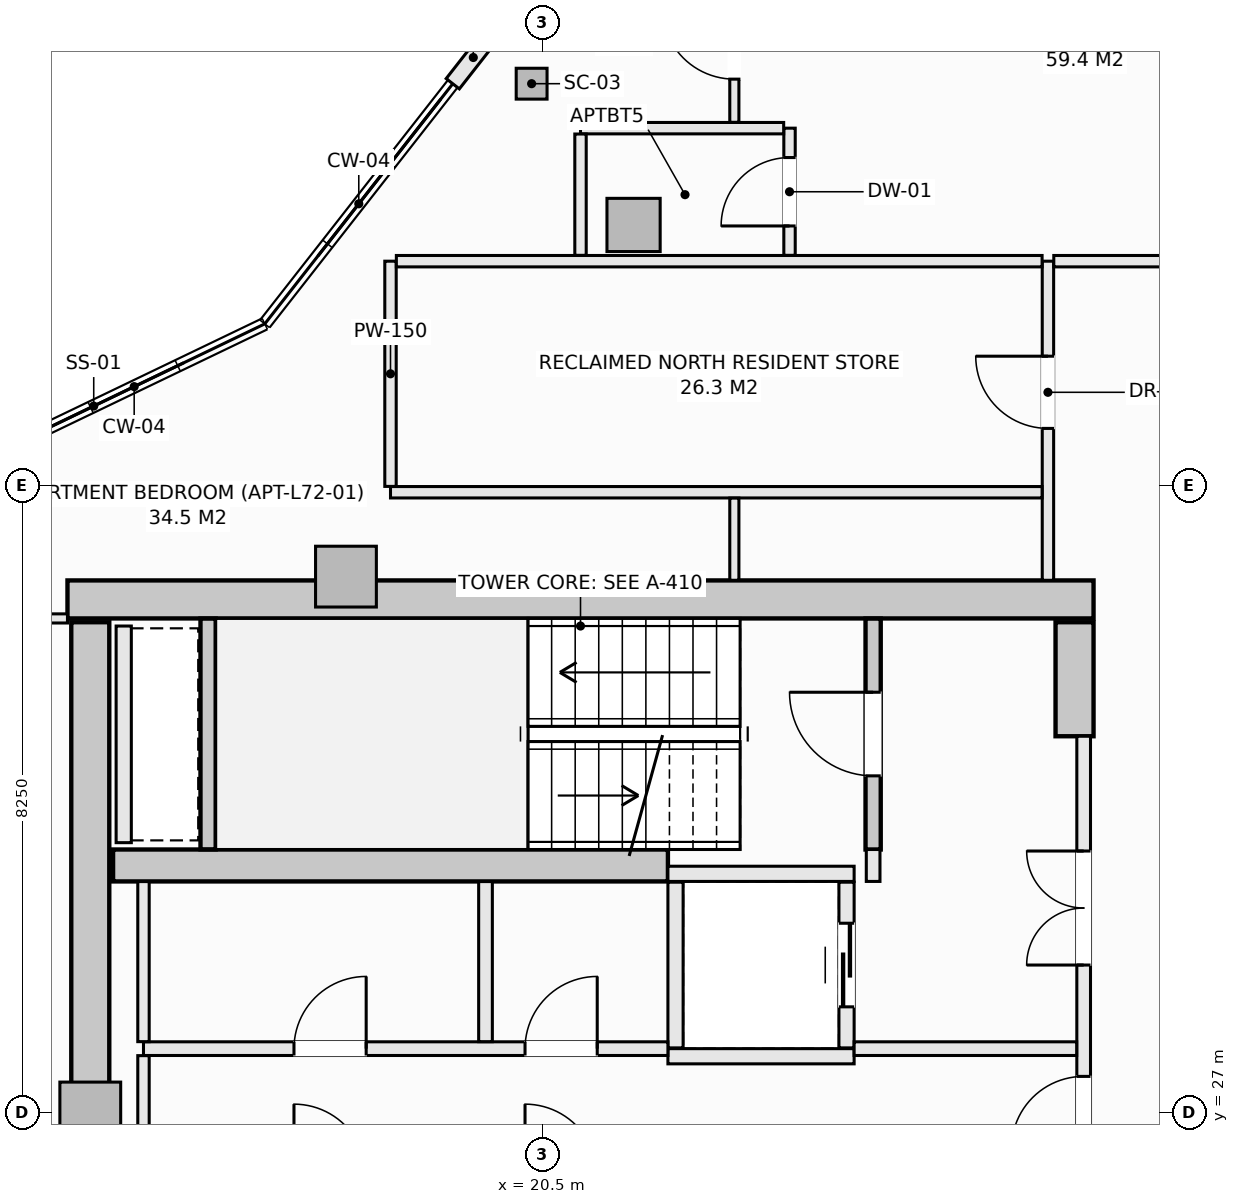
"""IFC4 building model, lengths in metres.
Left out: names, types, materials, properties, quantities, classifications, styles, units other than length and angle.
Written with IfcOpenShell. Run it as: python <this file> out.ifc"""

import sys

from ifc_helpers import new_model, si_unit, direction, frame, frame_2d, origin, origin_2d, place, context, subcontext, project, spatial, rectangle, hollow_rectangle, extrude, element, fill, save


model = new_model("IFC4")
c1 = context("Model", 3, precision=1e-05, world=origin(), true_north=direction((0.0, 1.0)))
c2 = subcontext(c1, "Body", "Model", "MODEL_VIEW")
j1 = project(units=[si_unit("LENGTHUNIT", "METRE"), si_unit("PLANEANGLEUNIT", "RADIAN")], contexts=[c1])
p1 = place(None, origin())
s1 = spatial("IfcSite", under=j1, at=p1, CompositionType="ELEMENT")
p2 = place(p1, origin())
s2 = spatial("IfcBuilding", under=s1, at=p2, CompositionType="ELEMENT")
p3 = place(p2, frame((0.0, 0.0, 265.7)))
s3 = spatial("IfcBuildingStorey", under=s2, at=p3, CompositionType="ELEMENT", Elevation=265.7)
p4 = place(p3, frame((14.25, 33.75, -0.27), z_axis=(0.0, 0.0, 1.0), x_axis=(1.0, 0.0, 0.0)))
e1 = element("IfcWall", 1, at=p4, inside=s3, PredefinedType="SHEAR", context=c2, shape_type="SweptSolid", body=[
    extrude(rectangle(XDim=13.5, YDim=0.5, at=frame_2d((6.75, 0.0))), origin(), (0.0, 0.0, 1.0), 3.3),
])
p5 = place(p3, frame((14.55, 20.55, -0.27), z_axis=(0.0, 0.0, 1.0), x_axis=(0.0, 1.0, 0.0)))
e2 = element("IfcWall", 2, at=p5, inside=s3, PredefinedType="SHEAR", context=c2, shape_type="SweptSolid", body=[
    extrude(rectangle(XDim=12.9, YDim=0.5, at=frame_2d((6.45, 0.0))), origin(), (0.0, 0.0, 1.0), 3.3),
])
p6 = place(p3, frame((27.5, 31.95, -0.27), z_axis=(0.0, 0.0, 1.0), x_axis=(0.0, 1.0, 0.0)))
e3 = element("IfcWall", 3, at=p6, inside=s3, PredefinedType="SHEAR", context=c2, shape_type="SweptSolid", body=[
    extrude(rectangle(XDim=1.5, YDim=0.5, at=frame_2d((0.75, 0.0))), origin(), (0.0, 0.0, 1.0), 3.3),
])
p7 = place(p3, frame((14.85, 30.25, -0.27), z_axis=(0.0, 0.0, 1.0), x_axis=(1.0, 0.0, 0.0)))
e4 = element("IfcWall", 4, at=p7, inside=s3, PredefinedType="SHEAR", context=c2, shape_type="SweptSolid", body=[
    extrude(rectangle(XDim=7.3, YDim=0.42, at=frame_2d((3.65, 0.0))), origin(), (0.0, 0.0, 1.0), 3.3),
])
p8 = place(p3, frame((20.357, 40.535, -0.27), z_axis=(0.0, 0.0, 1.0), x_axis=(1.0, 0.0, 0.0)))
e5 = element("IfcColumn", 5, at=p8, inside=s3, PredefinedType="COLUMN", context=c2, shape_type="SweptSolid", body=[
    extrude(hollow_rectangle(XDim=0.406, YDim=0.406, WallThickness=0.016, at=origin_2d()), origin(), (0.0, 0.0, 1.0), 3.3),
])
p9 = place(p3, frame((21.698, 38.677, -0.27), z_axis=(0.0, 0.0, 1.0), x_axis=(1.0, 0.0, 0.0)))
e6 = element("IfcColumn", 6, at=p9, inside=s3, PredefinedType="COLUMN", context=c2, shape_type="SweptSolid", body=[
    extrude(rectangle(XDim=0.7, YDim=0.7, at=origin_2d()), origin(), (0.0, 0.0, 1.0), 3.3),
])
for number, where, z_axis, x_axis in (
    (7, (17.914, 34.05, -0.27), (0.0, 0.0, 1.0), (1.0, 0.0, 0.0)),
    (8, (14.55, 27.0, -0.27), (0.0, 0.0, 1.0), (1.0, 0.0, 0.0)),
):
    element("IfcColumn", number, at=place(p3, frame(where, z_axis=z_axis, x_axis=x_axis)), inside=s3, PredefinedType="PILASTER", context=c2, shape_type="SweptSolid", body=[
        extrude(rectangle(XDim=0.8, YDim=0.8, at=origin_2d()), origin(), (0.0, 0.0, 1.0), 3.3),
    ])
p10 = place(p3, frame((19.319, 40.534, 0.0), z_axis=(0.0, 0.0, 1.0), x_axis=(0.61640589237, 0.787428584604, 0.0)))
e9 = element("IfcWall", 9, at=p10, inside=s3, PredefinedType="SOLIDWALL", context=c2, shape_type="SweptSolid", body=[
    extrude(rectangle(XDim=0.876, YDim=0.22, at=frame_2d((0.438, 0.0))), origin(), (0.0, 0.0, 1.0), 2.605),
])
p11 = place(p3, frame((24.85, 30.46, -0.27), z_axis=(0.0, 0.0, 1.0), x_axis=(0.0, 1.0, 0.0)))
e10 = element("IfcWall", 10, at=p11, inside=s3, PredefinedType="SHEAR", context=c2, shape_type="SweptSolid", body=[
    extrude(rectangle(XDim=3.038, YDim=0.2, at=frame_2d((1.519, 0.0))), origin(), (0.0, 0.0, 1.0), 3.3),
])
p12 = place(p11, frame((0.969, 0.0, 0.27)))
e11 = element("IfcOpeningElement", 11, at=p12, cuts=e10, PredefinedType="OPENING", context=c2, shape_type="SweptSolid", body=[
    extrude(rectangle(XDim=1.1, YDim=2.15, at=frame_2d((0.55, 1.075))), frame((0.0, 0.11, 0.0), z_axis=(0.0, -1.0, 0.0), x_axis=(1.0, 0.0, 0.0)), (0.0, 0.0, 1.0), 0.22),
])
p13 = place(p3, frame((16.1, 30.462, -0.27), z_axis=(0.0, 0.0, 1.0), x_axis=(0.0, 1.0, 0.0)))
e12 = element("IfcWall", 12, at=p13, inside=s3, PredefinedType="SHEAR", context=c2, shape_type="SweptSolid", body=[
    extrude(rectangle(XDim=3.036, YDim=0.2, at=frame_2d((1.518, 0.0))), origin(), (0.0, 0.0, 1.0), 3.3),
])
for number, where, z_axis, x_axis in (
    (13, (22.15, 30.14, 0.0), (0.0, 0.0, 1.0), (1.0, 0.0, 0.0)),
    (14, (22.15, 27.74, 0.0), (0.0, 0.0, 1.0), (1.0, 0.0, 0.0)),
):
    element("IfcWall", number, at=place(p3, frame(where, z_axis=z_axis, x_axis=x_axis)), inside=s3, PredefinedType="SOLIDWALL", context=c2, shape_type="SweptSolid", body=[
        extrude(rectangle(XDim=2.45, YDim=0.2, at=frame_2d((1.225, 0.0))), origin(), (0.0, 0.0, 1.0), 3.03),
    ])
p14 = place(p3, frame((22.25, 27.85, 0.0), z_axis=(0.0, 0.0, 1.0), x_axis=(0.0, 1.0, 0.0)))
e15 = element("IfcWall", 15, at=p14, inside=s3, PredefinedType="SOLIDWALL", context=c2, shape_type="SweptSolid", body=[
    extrude(rectangle(XDim=2.18, YDim=0.2, at=frame_2d((1.09, 0.0))), origin(), (0.0, 0.0, 1.0), 3.03),
])
p15 = place(p3, frame((24.5, 27.85, 0.0), z_axis=(0.0, 0.0, 1.0), x_axis=(0.0, 1.0, 0.0)))
e16 = element("IfcWall", 16, at=p15, inside=s3, PredefinedType="SOLIDWALL", context=c2, shape_type="SweptSolid", body=[
    extrude(rectangle(XDim=2.18, YDim=0.2, at=frame_2d((1.09, 0.0))), origin(), (0.0, 0.0, 1.0), 3.03),
])
p16 = place(p15, frame((0.54, 0.0, 0.0)))
e17 = element("IfcOpeningElement", 17, at=p16, cuts=e16, PredefinedType="OPENING", context=c2, shape_type="SweptSolid", body=[
    extrude(rectangle(XDim=1.1, YDim=2.2, at=frame_2d((0.55, 1.1))), frame((0.0, 0.11, 0.0), z_axis=(0.0, -1.0, 0.0), x_axis=(1.0, 0.0, 0.0)), (0.0, 0.0, 1.0), 0.22),
])
p17 = place(p3, frame((14.99, 30.55, 0.0), z_axis=(0.0, 0.0, 1.0), x_axis=(0.0, 1.0, 0.0)))
e18 = element("IfcWall", 18, at=p17, inside=s3, PredefinedType="SOLIDWALL", context=c2, shape_type="SweptSolid", body=[
    extrude(rectangle(XDim=2.85, YDim=0.2, at=frame_2d((1.425, 0.0))), origin(), (0.0, 0.0, 1.0), 3.03),
])
p18 = place(p3, frame((24.85, 30.04, 0.0), z_axis=(0.0, 0.0, 1.0), x_axis=(0.0, 1.0, 0.0)))
e19 = element("IfcWall", 19, at=p18, inside=s3, PredefinedType="SOLIDWALL", context=c2, shape_type="SweptSolid", body=[
    extrude(rectangle(XDim=0.42, YDim=0.18, at=frame_2d((0.21, 0.0))), origin(), (0.0, 0.0, 1.0), 3.03),
])
p19 = place(p3, frame((27.62, 22.05, 0.0), z_axis=(0.0, 0.0, 1.0), x_axis=(0.0, 1.0, 0.0)))
e20 = element("IfcWall", 20, at=p19, inside=s3, PredefinedType="SOLIDWALL", context=c2, shape_type="SweptSolid", body=[
    extrude(rectangle(XDim=9.9, YDim=0.18, at=frame_2d((4.95, 0.0))), origin(), (0.0, 0.0, 1.0), 3.03),
])
p20 = place(p19, frame((4.475, 0.0, 0.0)))
e21 = element("IfcOpeningElement", 21, at=p20, cuts=e20, PredefinedType="OPENING", context=c2, shape_type="SweptSolid", body=[
    extrude(rectangle(XDim=0.95, YDim=2.1, at=frame_2d((0.475, 1.05))), frame((0.0, 0.1, 0.0), z_axis=(0.0, -1.0, 0.0), x_axis=(1.0, 0.0, 0.0)), (0.0, 0.0, 1.0), 0.2),
])
p21 = place(p19, frame((6.89, 0.0, 0.0)))
e22 = element("IfcOpeningElement", 22, at=p21, cuts=e20, PredefinedType="OPENING", context=c2, shape_type="SweptSolid", body=[
    extrude(rectangle(XDim=1.5, YDim=2.2, at=frame_2d((0.75, 1.1))), frame((0.0, 0.1, 0.0), z_axis=(0.0, -1.0, 0.0), x_axis=(1.0, 0.0, 0.0)), (0.0, 0.0, 1.0), 0.2),
])
p22 = place(p19, frame((1.51, 0.0, 0.0)))
e23 = element("IfcOpeningElement", 23, at=p22, cuts=e20, PredefinedType="OPENING", context=c2, shape_type="SweptSolid", body=[
    extrude(rectangle(XDim=1.5, YDim=2.2, at=frame_2d((0.75, 1.1))), frame((0.0, 0.1, 0.0), z_axis=(0.0, -1.0, 0.0), x_axis=(1.0, 0.0, 0.0)), (0.0, 0.0, 1.0), 0.2),
])
p23 = place(p3, frame((15.25, 27.84, 0.0), z_axis=(0.0, 0.0, 1.0), x_axis=(1.0, 0.0, 0.0)))
e24 = element("IfcWall", 24, at=p23, inside=s3, PredefinedType="SOLIDWALL", context=c2, shape_type="SweptSolid", body=[
    extrude(rectangle(XDim=6.9, YDim=0.18, at=frame_2d((3.45, 0.0))), origin(), (0.0, 0.0, 1.0), 3.03),
])
p24 = place(p23, frame((5.02, 0.0, 0.0)))
e25 = element("IfcOpeningElement", 25, at=p24, cuts=e24, PredefinedType="OPENING", context=c2, shape_type="SweptSolid", body=[
    extrude(rectangle(XDim=0.95, YDim=2.1, at=frame_2d((0.475, 1.05))), frame((0.0, 0.1, 0.0), z_axis=(0.0, -1.0, 0.0), x_axis=(1.0, 0.0, 0.0)), (0.0, 0.0, 1.0), 0.2),
])
p25 = place(p23, frame((1.98, 0.0, 0.0)))
e26 = element("IfcOpeningElement", 26, at=p25, cuts=e24, PredefinedType="OPENING", context=c2, shape_type="SweptSolid", body=[
    extrude(rectangle(XDim=0.95, YDim=2.1, at=frame_2d((0.475, 1.05))), frame((0.0, 0.1, 0.0), z_axis=(0.0, -1.0, 0.0), x_axis=(1.0, 0.0, 0.0)), (0.0, 0.0, 1.0), 0.2),
])
p26 = place(p3, frame((24.6, 27.84, 0.0), z_axis=(0.0, 0.0, 1.0), x_axis=(1.0, 0.0, 0.0)))
e27 = element("IfcWall", 27, at=p26, inside=s3, PredefinedType="SOLIDWALL", context=c2, shape_type="SweptSolid", body=[
    extrude(rectangle(XDim=2.928, YDim=0.18, at=frame_2d((1.464, 0.0))), origin(), (0.0, 0.0, 1.0), 3.03),
])
p27 = place(p3, frame((15.25, 26.252, 0.0), z_axis=(0.0, 0.0, 1.0), x_axis=(0.0, 1.0, 0.0)))
e28 = element("IfcWall", 28, at=p27, inside=s3, PredefinedType="PARTITIONING", context=c2, shape_type="SweptSolid", body=[
    extrude(rectangle(XDim=1.496, YDim=0.15, at=frame_2d((0.748, 0.0))), origin(), (0.0, 0.0, 1.0), 3.03),
])
p28 = place(p3, frame((15.25, 27.932, 0.0), z_axis=(0.0, 0.0, 1.0), x_axis=(0.0, 1.0, 0.0)))
e29 = element("IfcWall", 29, at=p28, inside=s3, PredefinedType="PARTITIONING", context=c2, shape_type="SweptSolid", body=[
    extrude(rectangle(XDim=2.106, YDim=0.15, at=frame_2d((1.053, 0.0))), origin(), (0.0, 0.0, 1.0), 3.03),
])
p29 = place(p3, frame((19.75, 27.932, 0.0), z_axis=(0.0, 0.0, 1.0), x_axis=(0.0, 1.0, 0.0)))
e30 = element("IfcWall", 30, at=p29, inside=s3, PredefinedType="SOLIDWALL", context=c2, shape_type="SweptSolid", body=[
    extrude(rectangle(XDim=2.106, YDim=0.18, at=frame_2d((1.053, 0.0))), origin(), (0.0, 0.0, 1.0), 3.03),
])
p30 = place(p3, frame((27.15, 34.002, 0.0), z_axis=(0.0, 0.0, 1.0), x_axis=(0.0, 1.0, 0.0)))
e31 = element("IfcWall", 31, at=p30, inside=s3, PredefinedType="PARTITIONING", context=c2, shape_type="SweptSolid", body=[
    extrude(rectangle(XDim=4.198, YDim=0.15, at=frame_2d((2.099, 0.0))), origin(), (0.0, 0.0, 1.0), 3.03),
])
p31 = place(p30, frame((1.998, 0.0, 0.0)))
e32 = element("IfcOpeningElement", 32, at=p31, cuts=e31, PredefinedType="OPENING", context=c2, shape_type="SweptSolid", body=[
    extrude(rectangle(XDim=0.95, YDim=2.1, at=frame_2d((0.475, 1.05))), frame((0.0, 0.085, 0.0), z_axis=(0.0, -1.0, 0.0), x_axis=(1.0, 0.0, 0.0)), (0.0, 0.0, 1.0), 0.17),
])
p32 = place(p3, frame((18.5, 35.16, 0.0), z_axis=(0.0, 0.0, 1.0), x_axis=(1.0, 0.0, 0.0)))
e33 = element("IfcWall", 33, at=p32, inside=s3, PredefinedType="PARTITIONING", context=c2, shape_type="SweptSolid", body=[
    extrude(rectangle(XDim=8.573, YDim=0.15, at=frame_2d((4.287, 0.0))), origin(), (0.0, 0.0, 1.0), 3.03),
])
p33 = place(p3, frame((18.5, 35.237, 0.0), z_axis=(0.0, 0.0, 1.0), x_axis=(0.0, 1.0, 0.0)))
e34 = element("IfcWall", 34, at=p33, inside=s3, PredefinedType="PARTITIONING", context=c2, shape_type="SweptSolid", body=[
    extrude(rectangle(XDim=2.963, YDim=0.15, at=frame_2d((1.481, 0.0))), origin(), (0.0, 0.0, 1.0), 3.03),
])
p34 = place(p3, frame((18.577, 38.2, 0.0), z_axis=(0.0, 0.0, 1.0), x_axis=(1.0, 0.0, 0.0)))
e35 = element("IfcWall", 35, at=p34, inside=s3, PredefinedType="PARTITIONING", context=c2, shape_type="SweptSolid", body=[
    extrude(rectangle(XDim=8.496, YDim=0.15, at=frame_2d((4.248, 0.0))), origin(), (0.0, 0.0, 1.0), 3.03),
])
p35 = place(p3, frame((27.227, 38.2, 0.0), z_axis=(0.0, 0.0, 1.0), x_axis=(1.0, 0.0, 0.0)))
e36 = element("IfcWall", 36, at=p35, inside=s3, PredefinedType="PARTITIONING", context=c2, shape_type="SweptSolid", body=[
    extrude(rectangle(XDim=2.711, YDim=0.15, at=frame_2d((1.355, 0.0))), origin(), (0.0, 0.0, 1.0), 3.03),
])
p36 = place(p3, frame((11.629, 33.5, 0.0), z_axis=(0.0, 0.0, 1.0), x_axis=(1.0, 0.0, 0.0)))
e37 = element("IfcWall", 37, at=p36, inside=s3, PredefinedType="PARTITIONING", context=c2, shape_type="SweptSolid", body=[
    extrude(rectangle(XDim=2.621, YDim=0.12, at=frame_2d((1.311, 0.0))), origin(), (0.0, 0.0, 1.0), 3.03),
])
p37 = place(p3, frame((23.75, 38.277, 0.0), z_axis=(0.0, 0.0, 1.0), x_axis=(0.0, 1.0, 0.0)))
e38 = element("IfcWall", 38, at=p37, inside=s3, PredefinedType="PARTITIONING", context=c2, shape_type="SweptSolid", body=[
    extrude(rectangle(XDim=1.673, YDim=0.15, at=frame_2d((0.836, 0.0))), origin(), (0.0, 0.0, 1.0), 3.03),
])
p38 = place(p37, frame((0.386, 0.0, 0.0)))
e39 = element("IfcOpeningElement", 39, at=p38, cuts=e38, PredefinedType="OPENING", context=c2, shape_type="SweptSolid", body=[
    extrude(rectangle(XDim=0.9, YDim=2.1, at=frame_2d((0.45, 1.05))), frame((0.0, 0.085, 0.0), z_axis=(0.0, -1.0, 0.0), x_axis=(1.0, 0.0, 0.0)), (0.0, 0.0, 1.0), 0.17),
])
p39 = place(p3, frame((21.0, 39.95, 0.0), z_axis=(0.0, 0.0, 1.0), x_axis=(1.0, 0.0, 0.0)))
e40 = element("IfcWall", 40, at=p39, inside=s3, PredefinedType="PARTITIONING", context=c2, shape_type="SweptSolid", body=[
    extrude(rectangle(XDim=2.673, YDim=0.15, at=frame_2d((1.336, 0.0))), origin(), (0.0, 0.0, 1.0), 3.03),
])
p40 = place(p3, frame((23.024, 34.002, 0.0), z_axis=(0.0, 0.0, 1.0), x_axis=(0.0, 1.0, 0.0)))
e41 = element("IfcWall", 41, at=p40, inside=s3, PredefinedType="PARTITIONING", context=c2, shape_type="SweptSolid", body=[
    extrude(rectangle(XDim=1.081, YDim=0.12, at=frame_2d((0.541, 0.0))), origin(), (0.0, 0.0, 1.0), 3.03),
])
p41 = place(p3, frame((23.024, 40.027, 0.0), z_axis=(0.0, 0.0, 1.0), x_axis=(0.0, 1.0, 0.0)))
e42 = element("IfcWall", 42, at=p41, inside=s3, PredefinedType="PARTITIONING", context=c2, shape_type="SweptSolid", body=[
    extrude(rectangle(XDim=2.086, YDim=0.12, at=frame_2d((1.043, 0.0))), origin(), (0.0, 0.0, 1.0), 3.03),
])
p42 = place(p41, frame((0.568, 0.0, 0.0)))
e43 = element("IfcOpeningElement", 43, at=p42, cuts=e42, PredefinedType="OPENING", context=c2, shape_type="SweptSolid", body=[
    extrude(rectangle(XDim=0.95, YDim=2.1, at=frame_2d((0.475, 1.05))), frame((0.0, 0.07, 0.0), z_axis=(0.0, -1.0, 0.0), x_axis=(1.0, 0.0, 0.0)), (0.0, 0.0, 1.0), 0.14),
])
p43 = place(p3, frame((21.0, 38.277, 0.0), z_axis=(0.0, 0.0, 1.0), x_axis=(0.0, 1.0, 0.0)))
e44 = element("IfcWall", 44, at=p43, inside=s3, PredefinedType="PARTITIONING", context=c2, shape_type="SweptSolid", body=[
    extrude(rectangle(XDim=1.596, YDim=0.15, at=frame_2d((0.798, 0.0))), origin(), (0.0, 0.0, 1.0), 2.478),
])
p44 = place(p12, origin())
e45 = element("IfcDoor", 45, at=p44, inside=s3, OperationType="SINGLE_SWING_RIGHT", PredefinedType="DOOR", context=c2, shape_type="SweptSolid", body=[
    extrude(rectangle(XDim=1.1, YDim=2.15, at=frame_2d((0.55, 1.075))), frame((0.0, 0.025, 0.0), z_axis=(0.0, -1.0, 0.0), x_axis=(1.0, 0.0, 0.0)), (0.0, 0.0, 1.0), 0.05),
])
fill(e11, e45)
p45 = place(p16, origin())
e46 = element("IfcDoor", 46, at=p45, inside=s3, OperationType="SLIDING_TO_LEFT", PredefinedType="DOOR", context=c2, shape_type="SweptSolid", body=[
    extrude(rectangle(XDim=1.1, YDim=2.2, at=frame_2d((0.55, 1.1))), frame((0.0, 0.025, 0.0), z_axis=(0.0, -1.0, 0.0), x_axis=(1.0, 0.0, 0.0)), (0.0, 0.0, 1.0), 0.05),
])
fill(e17, e46)
p46 = place(p20, origin())
e47 = element("IfcDoor", 47, at=p46, inside=s3, OperationType="SINGLE_SWING_LEFT", PredefinedType="DOOR", context=c2, shape_type="SweptSolid", body=[
    extrude(rectangle(XDim=0.95, YDim=2.1, at=frame_2d((0.475, 1.05))), frame((0.0, 0.025, 0.0), z_axis=(0.0, -1.0, 0.0), x_axis=(1.0, 0.0, 0.0)), (0.0, 0.0, 1.0), 0.05),
])
fill(e21, e47)
p47 = place(p21, origin())
e48 = element("IfcDoor", 48, at=p47, inside=s3, OperationType="DOUBLE_DOOR_SINGLE_SWING", PredefinedType="DOOR", context=c2, shape_type="SweptSolid", body=[
    extrude(rectangle(XDim=1.5, YDim=2.2, at=frame_2d((0.75, 1.1))), frame((0.0, 0.025, 0.0), z_axis=(0.0, -1.0, 0.0), x_axis=(1.0, 0.0, 0.0)), (0.0, 0.0, 1.0), 0.05),
])
fill(e22, e48)
p48 = place(p24, origin())
e49 = element("IfcDoor", 49, at=p48, inside=s3, OperationType="SINGLE_SWING_RIGHT", PredefinedType="DOOR", context=c2, shape_type="SweptSolid", body=[
    extrude(rectangle(XDim=0.95, YDim=2.1, at=frame_2d((0.475, 1.05))), frame((0.0, 0.025, 0.0), z_axis=(0.0, -1.0, 0.0), x_axis=(1.0, 0.0, 0.0)), (0.0, 0.0, 1.0), 0.05),
])
fill(e25, e49)
p49 = place(p25, origin())
e50 = element("IfcDoor", 50, at=p49, inside=s3, OperationType="SINGLE_SWING_RIGHT", PredefinedType="DOOR", context=c2, shape_type="SweptSolid", body=[
    extrude(rectangle(XDim=0.95, YDim=2.1, at=frame_2d((0.475, 1.05))), frame((0.0, 0.025, 0.0), z_axis=(0.0, -1.0, 0.0), x_axis=(1.0, 0.0, 0.0)), (0.0, 0.0, 1.0), 0.05),
])
fill(e26, e50)
p50 = place(p31, origin())
e51 = element("IfcDoor", 51, at=p50, inside=s3, OperationType="SINGLE_SWING_RIGHT", PredefinedType="DOOR", context=c2, shape_type="SweptSolid", body=[
    extrude(rectangle(XDim=0.95, YDim=2.1, at=frame_2d((0.475, 1.05))), frame((0.0, 0.025, 0.0), z_axis=(0.0, -1.0, 0.0), x_axis=(1.0, 0.0, 0.0)), (0.0, 0.0, 1.0), 0.05),
])
fill(e32, e51)
p51 = place(p38, origin())
e52 = element("IfcDoor", 52, at=p51, inside=s3, OperationType="SINGLE_SWING_LEFT", PredefinedType="DOOR", context=c2, shape_type="SweptSolid", body=[
    extrude(rectangle(XDim=0.9, YDim=2.1, at=frame_2d((0.45, 1.05))), frame((0.0, 0.025, 0.0), z_axis=(0.0, -1.0, 0.0), x_axis=(1.0, 0.0, 0.0)), (0.0, 0.0, 1.0), 0.05),
])
fill(e39, e52)
p52 = place(p42, origin())
e53 = element("IfcDoor", 53, at=p52, inside=s3, OperationType="SINGLE_SWING_RIGHT", PredefinedType="DOOR", context=c2, shape_type="SweptSolid", body=[
    extrude(rectangle(XDim=0.95, YDim=2.1, at=frame_2d((0.475, 1.05))), frame((0.0, 0.025, 0.0), z_axis=(0.0, -1.0, 0.0), x_axis=(1.0, 0.0, 0.0)), (0.0, 0.0, 1.0), 0.05),
])
fill(e43, e53)
save(model, sys.argv[1])
